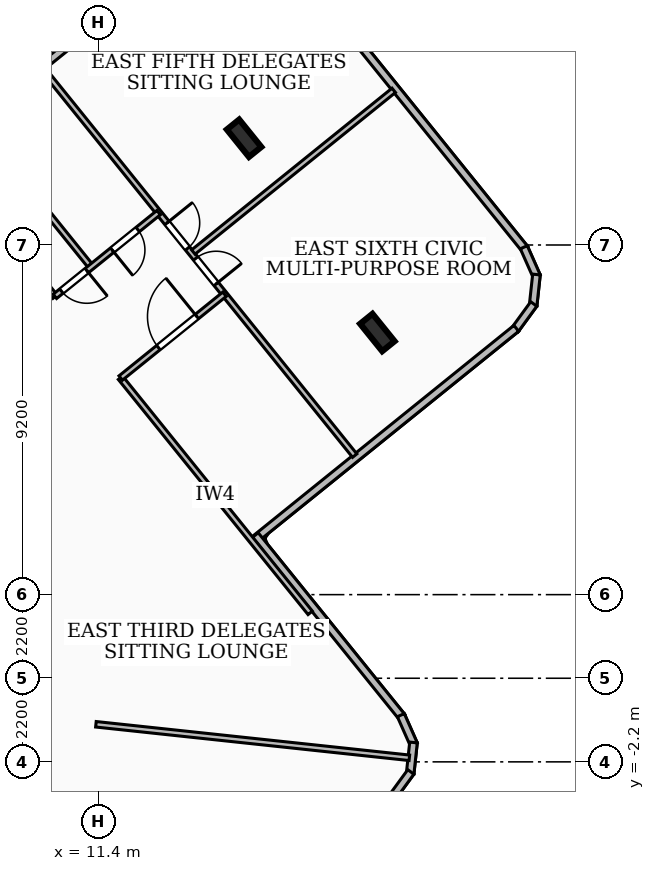
"""IFC4 building model, lengths in metres.
Left out: names, types, materials, properties, quantities, classifications, styles, units other than length and angle.
Written with IfcOpenShell. Run it as: python <this file> out.ifc"""

import sys

from ifc_helpers import new_model, si_unit, direction, frame, frame_2d, origin, origin_2d, place, context, subcontext, project, spatial, rectangle, i_section, extrude, element, fill, save


model = new_model("IFC4")
c1 = context("Model", 3, precision=1e-05, world=origin(), true_north=direction((0.0, 1.0)))
c2 = subcontext(c1, "Body", "Model", "MODEL_VIEW")
j1 = project(units=[si_unit("LENGTHUNIT", "METRE"), si_unit("PLANEANGLEUNIT", "RADIAN")], contexts=[c1])
p1 = place(None, origin())
s1 = spatial("IfcSite", under=j1, at=p1, CompositionType="ELEMENT")
p2 = place(p1, origin())
s2 = spatial("IfcBuilding", under=s1, at=p2, CompositionType="ELEMENT")
p3 = place(p2, frame((0.0, 0.0, 235.98)))
s3 = spatial("IfcBuildingStorey", under=s2, at=p3, CompositionType="ELEMENT", Elevation=235.98)
for number, where, z_axis, x_axis in (
    (1, (18.741, 9.097, 0.0), (0.0, 0.0, 1.0), (0.778, 0.628, 0.0)),
    (2, (15.234, 14.209, 0.0), (0.0, 0.0, 1.0), (0.778, 0.628, 0.0)),
):
    element("IfcColumn", number, at=place(p3, frame(where, z_axis=z_axis, x_axis=x_axis)), inside=s3, PredefinedType="COLUMN", context=c2, shape_type="SweptSolid", body=[
        extrude(i_section(OverallWidth=0.418, OverallDepth=0.927, WebThickness=0.019, FlangeThickness=0.032, at=origin_2d()), origin(), (0.0, 0.0, 1.0), 3.42),
    ])
p4 = place(p3, frame((7.228, 13.927, 0.0), z_axis=(0.0, 0.0, 1.0), x_axis=(0.778207970315, 0.628006651985, 0.0)))
e3 = element("IfcWall", 3, at=p4, inside=s3, PredefinedType="SOLIDWALL", context=c2, shape_type="SweptSolid", body=[
    extrude(rectangle(XDim=8.841, YDim=0.2, at=frame_2d((4.42, 0.0))), origin(), (0.0, 0.0, 1.0), 3.02),
])
p5 = place(p3, frame((16.201, 19.255, 0.0), z_axis=(0.0, 0.0, 1.0), x_axis=(0.628000746334, -0.778212736084, 0.0)))
e4 = element("IfcWall", 4, at=p5, inside=s3, PredefinedType="SOLIDWALL", context=c2, shape_type="SweptSolid", body=[
    extrude(rectangle(XDim=10.223, YDim=0.2, at=frame_2d((5.112, 0.0))), origin(), (0.0, 0.0, 1.0), 3.02),
])
p6 = place(p3, frame((22.595, 11.341, 0.0), z_axis=(0.0, 0.0, 1.0), x_axis=(0.405733056368, -0.913991623031, 0.0)))
e5 = element("IfcWall", 5, at=p6, inside=s3, PredefinedType="SOLIDWALL", context=c2, shape_type="SweptSolid", body=[
    extrude(rectangle(XDim=0.838, YDim=0.2, at=frame_2d((0.419, 0.0))), origin(), (0.0, 0.0, 1.0), 3.02),
])
p7 = place(p3, frame((22.928, 10.623, 0.0), z_axis=(0.0, 0.0, 1.0), x_axis=(-0.107734860634, -0.994179661733, 0.0)))
e6 = element("IfcWall", 6, at=p7, inside=s3, PredefinedType="SOLIDWALL", context=c2, shape_type="SweptSolid", body=[
    extrude(rectangle(XDim=0.825, YDim=0.2, at=frame_2d((0.413, 0.0))), origin(), (0.0, 0.0, 1.0), 3.02),
])
p8 = place(p3, frame((22.857, 9.848, 0.0), z_axis=(0.0, 0.0, 1.0), x_axis=(-0.589366307287, -0.807865926893, 0.0)))
e7 = element("IfcWall", 7, at=p8, inside=s3, PredefinedType="SOLIDWALL", context=c2, shape_type="SweptSolid", body=[
    extrude(rectangle(XDim=0.838, YDim=0.2, at=frame_2d((0.419, 0.0))), origin(), (0.0, 0.0, 1.0), 3.02),
])
p9 = place(p3, frame((22.397, 9.207, 0.0), z_axis=(0.0, 0.0, 1.0), x_axis=(-0.778197552188, -0.628019561613, 0.0)))
e8 = element("IfcWall", 8, at=p9, inside=s3, PredefinedType="SOLIDWALL", context=c2, shape_type="SweptSolid", body=[
    extrude(rectangle(XDim=8.842, YDim=0.2, at=frame_2d((4.421, 0.0))), origin(), (0.0, 0.0, 1.0), 3.02),
])
p10 = place(p3, frame((15.528, 3.766, 0.0), z_axis=(0.0, 0.0, 1.0), x_axis=(0.62803447323, -0.778185518007, 0.0)))
e9 = element("IfcWall", 9, at=p10, inside=s3, PredefinedType="SOLIDWALL", context=c2, shape_type="SweptSolid", body=[
    extrude(rectangle(XDim=6.141, YDim=0.2, at=frame_2d((3.071, 0.0))), origin(), (0.0, 0.0, 1.0), 3.02),
])
p11 = place(p3, frame((19.359, -0.971, 0.0), z_axis=(0.0, 0.0, 1.0), x_axis=(0.405301422885, -0.914183108905, 0.0)))
e10 = element("IfcWall", 10, at=p11, inside=s3, PredefinedType="SOLIDWALL", context=c2, shape_type="SweptSolid", body=[
    extrude(rectangle(XDim=0.839, YDim=0.2, at=frame_2d((0.419, 0.0))), origin(), (0.0, 0.0, 1.0), 3.02),
])
p12 = place(p3, frame((19.692, -1.69, 0.0), z_axis=(0.0, 0.0, 1.0), x_axis=(-0.10656447925, -0.994305793889, 0.0)))
e11 = element("IfcWall", 11, at=p12, inside=s3, PredefinedType="SOLIDWALL", context=c2, shape_type="SweptSolid", body=[
    extrude(rectangle(XDim=0.825, YDim=0.2, at=frame_2d((0.412, 0.0))), origin(), (0.0, 0.0, 1.0), 3.02),
])
p13 = place(p3, frame((19.622, -2.465, 0.0), z_axis=(0.0, 0.0, 1.0), x_axis=(-0.590315771763, -0.807172403894, 0.0)))
e12 = element("IfcWall", 12, at=p13, inside=s3, PredefinedType="SOLIDWALL", context=c2, shape_type="SweptSolid", body=[
    extrude(rectangle(XDim=0.839, YDim=0.2, at=frame_2d((0.419, 0.0))), origin(), (0.0, 0.0, 1.0), 3.02),
])
p14 = place(p3, frame((11.335, -1.211, 0.0), z_axis=(0.0, 0.0, 1.0), x_axis=(0.994330067434, -0.106337749634, 0.0)))
e13 = element("IfcWall", 13, at=p14, inside=s3, PredefinedType="PARTITIONING", context=c2, shape_type="SweptSolid", body=[
    extrude(rectangle(XDim=8.295, YDim=0.145, at=frame_2d((4.147, 0.0))), origin(), (0.0, 0.0, 1.0), 3.02),
])
p15 = place(p3, frame((10.261, 10.04, 0.0), z_axis=(0.0, 0.0, 1.0), x_axis=(-0.627945544918, 0.778257279193, 0.0)))
e14 = element("IfcWall", 14, at=p15, inside=s3, PredefinedType="PARTITIONING", context=c2, shape_type="SweptSolid", body=[
    extrude(rectangle(XDim=8.55, YDim=0.145, at=frame_2d((4.275, 0.0))), origin(), (0.0, 0.0, 1.0), 3.02),
])
p16 = place(p3, frame((16.974, 1.721, 0.0), z_axis=(0.0, 0.0, 1.0), x_axis=(-0.62808974226, 0.778140909905, 0.0)))
e15 = element("IfcWall", 15, at=p16, inside=s3, PredefinedType="PARTITIONING", context=c2, shape_type="SweptSolid", body=[
    extrude(rectangle(XDim=7.95, YDim=0.145, at=frame_2d((3.975, 0.0))), origin(), (0.0, 0.0, 1.0), 3.02),
])
p17 = place(p3, frame((11.199, 10.836, 0.0), z_axis=(0.0, 0.0, 1.0), x_axis=(-0.627885679676, 0.778305578329, 0.0)))
e16 = element("IfcWall", 16, at=p17, inside=s3, PredefinedType="PARTITIONING", context=c2, shape_type="SweptSolid", body=[
    extrude(rectangle(XDim=4.835, YDim=0.145, at=frame_2d((2.417, 0.0))), origin(), (0.0, 0.0, 1.0), 3.02),
])
p18 = place(p3, frame((12.986, 12.252, 0.0), z_axis=(0.0, 0.0, 1.0), x_axis=(-0.778235364872, -0.627972703915, 0.0)))
e17 = element("IfcWall", 17, at=p18, inside=s3, PredefinedType="PARTITIONING", context=c2, shape_type="SweptSolid", body=[
    extrude(rectangle(XDim=3.51, YDim=0.145, at=frame_2d((1.755, 0.0))), origin(), (0.0, 0.0, 1.0), 2.39),
])
p19 = place(p18, frame((2.429, 0.0, 0.0)))
e18 = element("IfcOpeningElement", 18, at=p19, cuts=e17, PredefinedType="OPENING", context=c2, shape_type="SweptSolid", body=[
    extrude(rectangle(XDim=0.86, YDim=2.04, at=frame_2d((0.43, 1.02))), frame((0.0, 0.083, 0.0), z_axis=(0.0, -1.0, 0.0), x_axis=(1.0, 0.0, 0.0)), (0.0, 0.0, 1.0), 0.165),
])
p20 = place(p18, frame((0.709, 0.0, 0.0)))
e19 = element("IfcOpeningElement", 19, at=p20, cuts=e17, PredefinedType="OPENING", context=c2, shape_type="SweptSolid", body=[
    extrude(rectangle(XDim=0.86, YDim=2.04, at=frame_2d((0.43, 1.02))), frame((0.0, 0.083, 0.0), z_axis=(0.0, -1.0, 0.0), x_axis=(1.0, 0.0, 0.0)), (0.0, 0.0, 1.0), 0.165),
])
p21 = place(p3, frame((11.988, 7.9, 0.0), z_axis=(0.0, 0.0, 1.0), x_axis=(0.778173929493, 0.628048832064, 0.0)))
e20 = element("IfcWall", 20, at=p21, inside=s3, PredefinedType="PARTITIONING", context=c2, shape_type="SweptSolid", body=[
    extrude(rectangle(XDim=3.51, YDim=0.145, at=frame_2d((1.755, 0.0))), origin(), (0.0, 0.0, 1.0), 2.39),
])
p22 = place(p21, frame((1.275, 0.0, 0.0)))
e21 = element("IfcOpeningElement", 21, at=p22, cuts=e20, PredefinedType="OPENING", context=c2, shape_type="SweptSolid", body=[
    extrude(rectangle(XDim=1.3, YDim=2.1, at=frame_2d((0.65, 1.05))), frame((0.0, 0.083, 0.0), z_axis=(0.0, -1.0, 0.0), x_axis=(1.0, 0.0, 0.0)), (0.0, 0.0, 1.0), 0.165),
])
p23 = place(p3, frame((13.899, 11.215, 0.0), z_axis=(0.0, 0.0, 1.0), x_axis=(0.778317035858, 0.62787147705, 0.0)))
e22 = element("IfcWall", 22, at=p23, inside=s3, PredefinedType="PARTITIONING", context=c2, shape_type="SweptSolid", body=[
    extrude(rectangle(XDim=6.775, YDim=0.145, at=frame_2d((3.388, 0.0))), origin(), (0.0, 0.0, 1.0), 3.02),
])
p24 = place(p3, frame((9.938, 16.03, 0.0), z_axis=(0.0, 0.0, 1.0), x_axis=(0.62792440114, -0.778274338812, 0.0)))
e23 = element("IfcWall", 23, at=p24, inside=s3, PredefinedType="PARTITIONING", context=c2, shape_type="SweptSolid", body=[
    extrude(rectangle(XDim=13.07, YDim=0.145, at=frame_2d((6.535, 0.0))), origin(), (0.0, 0.0, 1.0), 2.39),
])
p25 = place(p24, frame((6.405, 0.0, 0.0)))
e24 = element("IfcOpeningElement", 24, at=p25, cuts=e23, PredefinedType="OPENING", context=c2, shape_type="SweptSolid", body=[
    extrude(rectangle(XDim=0.86, YDim=2.04, at=frame_2d((0.43, 1.02))), frame((0.0, 0.083, 0.0), z_axis=(0.0, -1.0, 0.0), x_axis=(1.0, 0.0, 0.0)), (0.0, 0.0, 1.0), 0.165),
])
p26 = place(p24, frame((5.205, 0.0, 0.0)))
e25 = element("IfcOpeningElement", 25, at=p26, cuts=e23, PredefinedType="OPENING", context=c2, shape_type="SweptSolid", body=[
    extrude(rectangle(XDim=0.86, YDim=2.04, at=frame_2d((0.43, 1.02))), frame((0.0, 0.083, 0.0), z_axis=(0.0, -1.0, 0.0), x_axis=(1.0, 0.0, 0.0)), (0.0, 0.0, 1.0), 0.165),
])
p27 = place(p19, origin())
e26 = element("IfcDoor", 26, at=p27, inside=s3, OperationType="SINGLE_SWING_LEFT", PredefinedType="DOOR", context=c2, shape_type="SweptSolid", body=[
    extrude(rectangle(XDim=0.86, YDim=2.04, at=frame_2d((0.43, 1.02))), frame((0.0, 0.025, 0.0), z_axis=(0.0, -1.0, 0.0), x_axis=(1.0, 0.0, 0.0)), (0.0, 0.0, 1.0), 0.05),
])
fill(e18, e26)
p28 = place(p20, origin())
e27 = element("IfcDoor", 27, at=p28, inside=s3, OperationType="SINGLE_SWING_RIGHT", PredefinedType="DOOR", context=c2, shape_type="SweptSolid", body=[
    extrude(rectangle(XDim=0.86, YDim=2.04, at=frame_2d((0.43, 1.02))), frame((0.0, 0.025, 0.0), z_axis=(0.0, -1.0, 0.0), x_axis=(1.0, 0.0, 0.0)), (0.0, 0.0, 1.0), 0.05),
])
fill(e19, e27)
p29 = place(p22, origin())
e28 = element("IfcDoor", 28, at=p29, inside=s3, OperationType="SINGLE_SWING_RIGHT", PredefinedType="DOOR", context=c2, shape_type="SweptSolid", body=[
    extrude(rectangle(XDim=1.3, YDim=2.1, at=frame_2d((0.65, 1.05))), frame((0.0, 0.025, 0.0), z_axis=(0.0, -1.0, 0.0), x_axis=(1.0, 0.0, 0.0)), (0.0, 0.0, 1.0), 0.05),
])
fill(e21, e28)
p30 = place(p25, origin())
e29 = element("IfcDoor", 29, at=p30, inside=s3, OperationType="SINGLE_SWING_RIGHT", PredefinedType="DOOR", context=c2, shape_type="SweptSolid", body=[
    extrude(rectangle(XDim=0.86, YDim=2.04, at=frame_2d((0.43, 1.02))), frame((0.0, 0.025, 0.0), z_axis=(0.0, -1.0, 0.0), x_axis=(1.0, 0.0, 0.0)), (0.0, 0.0, 1.0), 0.05),
])
fill(e24, e29)
p31 = place(p26, origin())
e30 = element("IfcDoor", 30, at=p31, inside=s3, OperationType="SINGLE_SWING_LEFT", PredefinedType="DOOR", context=c2, shape_type="SweptSolid", body=[
    extrude(rectangle(XDim=0.86, YDim=2.04, at=frame_2d((0.43, 1.02))), frame((0.0, 0.025, 0.0), z_axis=(0.0, -1.0, 0.0), x_axis=(1.0, 0.0, 0.0)), (0.0, 0.0, 1.0), 0.05),
])
fill(e25, e30)
save(model, sys.argv[1])
